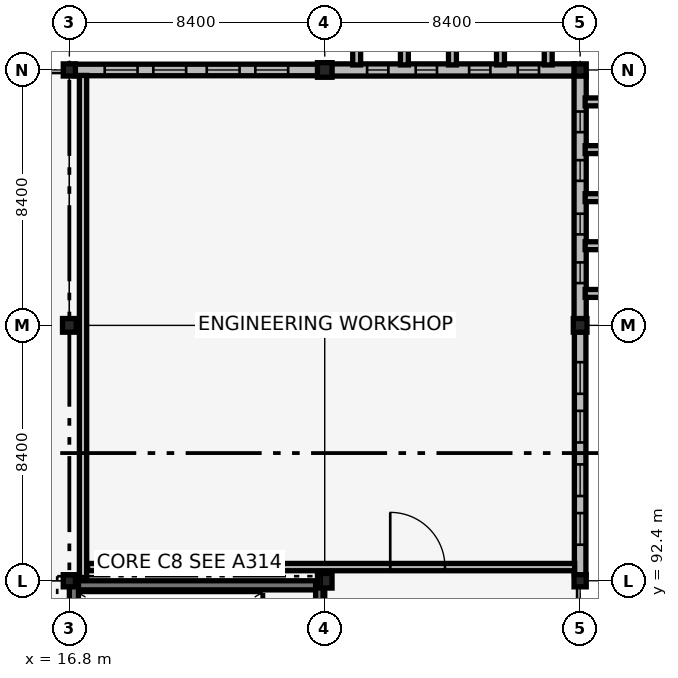
"""IFC4 building model, lengths in metres.
Left out: names, types, materials, properties, quantities, classifications, styles, units other than length and angle.
Written with IfcOpenShell. Run it as: python <this file> out.ifc"""

import sys

from ifc_helpers import new_model, si_unit, direction, frame, frame_2d, origin, origin_2d, place, context, subcontext, project, spatial, rectangle, extrude, element, fill, save


model = new_model("IFC4")
c1 = context("Model", 3, precision=1e-05, world=origin(), true_north=direction((0.0, 1.0)))
c2 = subcontext(c1, "Body", "Model", "MODEL_VIEW")
j1 = project(units=[si_unit("LENGTHUNIT", "METRE"), si_unit("PLANEANGLEUNIT", "RADIAN")], contexts=[c1])
p1 = place(None, origin())
s1 = spatial("IfcSite", under=j1, at=p1, CompositionType="ELEMENT")
p2 = place(p1, origin())
s2 = spatial("IfcBuilding", under=s1, at=p2, CompositionType="ELEMENT")
p3 = place(p2, frame((0.0, 0.0, 5.44)))
s3 = spatial("IfcBuildingStorey", under=s2, at=p3, CompositionType="ELEMENT", Elevation=5.44)
p4 = place(p3, frame((16.95, 92.25, 0.0), z_axis=(0.0, 0.0, 1.0), x_axis=(1.0, 0.0, 0.0)))
e1 = element("IfcWall", 1, at=p4, inside=s3, PredefinedType="SHEAR", context=c2, shape_type="SweptSolid", body=[
    extrude(rectangle(XDim=8.1, YDim=0.3, at=frame_2d((4.05, 0.0))), origin(), (0.0, 0.0, 1.0), 4.12),
])
p5 = place(p3, frame((16.95, 84.15, 0.0), z_axis=(0.0, 0.0, 1.0), x_axis=(0.0, 1.0, 0.0)))
e2 = element("IfcWall", 2, at=p5, inside=s3, PredefinedType="SHEAR", context=c2, shape_type="SweptSolid", body=[
    extrude(rectangle(XDim=8.1, YDim=0.3, at=frame_2d((4.05, 0.0))), origin(), (0.0, 0.0, 1.0), 4.12),
])
p6 = place(p5, frame((1.05, 0.0, 0.0)))
e3 = element("IfcOpeningElement", 3, at=p6, cuts=e2, PredefinedType="OPENING", context=c2, shape_type="SweptSolid", body=[
    extrude(rectangle(XDim=1.0, YDim=2.15, at=frame_2d((0.5, 1.075))), frame((0.0, 0.16, 0.0), z_axis=(0.0, -1.0, 0.0), x_axis=(1.0, 0.0, 0.0)), (0.0, 0.0, 1.0), 0.32),
])
p7 = place(p3, frame((25.05, 84.15, 0.0), z_axis=(0.0, 0.0, 1.0), x_axis=(0.0, 1.0, 0.0)))
e4 = element("IfcWall", 4, at=p7, inside=s3, PredefinedType="SHEAR", context=c2, shape_type="SweptSolid", body=[
    extrude(rectangle(XDim=8.1, YDim=0.3, at=frame_2d((4.05, 0.0))), origin(), (0.0, 0.0, 1.0), 4.12),
])
p8 = place(p7, frame((1.325, 0.0, 0.0)))
e5 = element("IfcOpeningElement", 5, at=p8, cuts=e4, PredefinedType="OPENING", context=c2, shape_type="SweptSolid", body=[
    extrude(rectangle(XDim=1.45, YDim=2.15, at=frame_2d((0.725, 1.075))), frame((0.0, 0.16, 0.0), z_axis=(0.0, -1.0, 0.0), x_axis=(1.0, 0.0, 0.0)), (0.0, 0.0, 1.0), 0.32),
])
p9 = place(p3, frame((16.8, 92.4, 0.0), z_axis=(0.0, 0.0, 1.0), x_axis=(1.0, 0.0, 0.0)))
e6 = element("IfcColumn", 6, at=p9, inside=s3, PredefinedType="COLUMN", context=c2, shape_type="SweptSolid", body=[
    extrude(rectangle(XDim=0.4, YDim=0.4, at=origin_2d()), origin(), (0.0, 0.0, 1.0), 4.12),
])
p10 = place(p3, frame((16.8, 100.8, 0.0), z_axis=(0.0, 0.0, 1.0), x_axis=(1.0, 0.0, 0.0)))
e7 = element("IfcColumn", 7, at=p10, inside=s3, PredefinedType="COLUMN", context=c2, shape_type="SweptSolid", body=[
    extrude(rectangle(XDim=0.45, YDim=0.45, at=origin_2d()), origin(), (0.0, 0.0, 1.0), 4.12),
])
p11 = place(p3, frame((16.8, 109.2, 0.0), z_axis=(0.0, 0.0, 1.0), x_axis=(1.0, 0.0, 0.0)))
e8 = element("IfcColumn", 8, at=p11, inside=s3, PredefinedType="COLUMN", context=c2, shape_type="SweptSolid", body=[
    extrude(rectangle(XDim=0.4, YDim=0.4, at=origin_2d()), origin(), (0.0, 0.0, 1.0), 4.12),
])
for number, where, z_axis, x_axis in (
    (9, (25.2, 92.4, 0.0), (0.0, 0.0, 1.0), (1.0, 0.0, 0.0)),
    (10, (25.2, 100.8, 0.0), (0.0, 0.0, 1.0), (1.0, 0.0, 0.0)),
    (11, (25.2, 109.2, 0.0), (0.0, 0.0, 1.0), (1.0, 0.0, 0.0)),
):
    element("IfcColumn", number, at=place(p3, frame(where, z_axis=z_axis, x_axis=x_axis)), inside=s3, PredefinedType="COLUMN", context=c2, shape_type="SweptSolid", body=[
        extrude(rectangle(XDim=0.48, YDim=0.48, at=origin_2d()), origin(), (0.0, 0.0, 1.0), 4.12),
    ])
p12 = place(p3, frame((33.6, 92.4, 0.0), z_axis=(0.0, 0.0, 1.0), x_axis=(1.0, 0.0, 0.0)))
e12 = element("IfcColumn", 12, at=p12, inside=s3, PredefinedType="COLUMN", context=c2, shape_type="SweptSolid", body=[
    extrude(rectangle(XDim=0.4, YDim=0.4, at=origin_2d()), origin(), (0.0, 0.0, 1.0), 4.12),
])
p13 = place(p3, frame((33.6, 100.8, 0.0), z_axis=(0.0, 0.0, 1.0), x_axis=(1.0, 0.0, 0.0)))
e13 = element("IfcColumn", 13, at=p13, inside=s3, PredefinedType="COLUMN", context=c2, shape_type="SweptSolid", body=[
    extrude(rectangle(XDim=0.45, YDim=0.45, at=origin_2d()), origin(), (0.0, 0.0, 1.0), 4.12),
])
p14 = place(p3, frame((33.6, 109.2, 0.0), z_axis=(0.0, 0.0, 1.0), x_axis=(1.0, 0.0, 0.0)))
e14 = element("IfcColumn", 14, at=p14, inside=s3, PredefinedType="COLUMN", context=c2, shape_type="SweptSolid", body=[
    extrude(rectangle(XDim=0.4, YDim=0.4, at=origin_2d()), origin(), (0.0, 0.0, 1.0), 4.12),
])
p15 = place(p3, frame((16.985, 109.2, 0.0), z_axis=(0.0, 0.0, 1.0), x_axis=(1.0, 0.0, 0.0)))
e15 = element("IfcWall", 15, at=p15, inside=s3, PredefinedType="SOLIDWALL", context=c2, shape_type="SweptSolid", body=[
    extrude(rectangle(XDim=7.99, YDim=0.38, at=frame_2d((3.995, 0.0))), origin(), (0.0, 0.0, 1.0), 4.12),
])
p16 = place(p15, frame((0.978, 0.0, 0.75)))
e16 = element("IfcOpeningElement", 16, at=p16, cuts=e15, PredefinedType="OPENING", context=c2, shape_type="SweptSolid", body=[
    extrude(rectangle(XDim=1.08, YDim=2.65, at=frame_2d((0.54, 1.325))), frame((0.0, 0.2, 0.0), z_axis=(0.0, -1.0, 0.0), x_axis=(1.0, 0.0, 0.0)), (0.0, 0.0, 1.0), 0.4),
])
p17 = place(p15, frame((2.576, 0.0, 0.75)))
e17 = element("IfcOpeningElement", 17, at=p17, cuts=e15, PredefinedType="OPENING", context=c2, shape_type="SweptSolid", body=[
    extrude(rectangle(XDim=1.08, YDim=2.65, at=frame_2d((0.54, 1.325))), frame((0.0, 0.2, 0.0), z_axis=(0.0, -1.0, 0.0), x_axis=(1.0, 0.0, 0.0)), (0.0, 0.0, 1.0), 0.4),
])
p18 = place(p15, frame((4.334, 0.0, 0.75)))
e18 = element("IfcOpeningElement", 18, at=p18, cuts=e15, PredefinedType="OPENING", context=c2, shape_type="SweptSolid", body=[
    extrude(rectangle(XDim=1.08, YDim=2.65, at=frame_2d((0.54, 1.325))), frame((0.0, 0.2, 0.0), z_axis=(0.0, -1.0, 0.0), x_axis=(1.0, 0.0, 0.0)), (0.0, 0.0, 1.0), 0.4),
])
p19 = place(p15, frame((5.932, 0.0, 0.75)))
e19 = element("IfcOpeningElement", 19, at=p19, cuts=e15, PredefinedType="OPENING", context=c2, shape_type="SweptSolid", body=[
    extrude(rectangle(XDim=1.08, YDim=2.65, at=frame_2d((0.54, 1.325))), frame((0.0, 0.2, 0.0), z_axis=(0.0, -1.0, 0.0), x_axis=(1.0, 0.0, 0.0)), (0.0, 0.0, 1.0), 0.4),
])
p20 = place(p3, frame((33.6, 92.585, 0.0), z_axis=(0.0, 0.0, 1.0), x_axis=(0.0, 1.0, 0.0)))
e20 = element("IfcWall", 20, at=p20, inside=s3, PredefinedType="SOLIDWALL", context=c2, shape_type="SweptSolid", body=[
    extrude(rectangle(XDim=8.005, YDim=0.38, at=frame_2d((4.002, 0.0))), origin(), (0.0, 0.0, 1.0), 4.12),
])
p21 = place(p20, frame((1.001, 0.0, 0.75)))
e21 = element("IfcOpeningElement", 21, at=p21, cuts=e20, PredefinedType="OPENING", context=c2, shape_type="SweptSolid", body=[
    extrude(rectangle(XDim=1.04, YDim=2.6, at=frame_2d((0.52, 1.3))), frame((0.0, 0.2, 0.0), z_axis=(0.0, -1.0, 0.0), x_axis=(1.0, 0.0, 0.0)), (0.0, 0.0, 1.0), 0.4),
])
p22 = place(p20, frame((2.602, 0.0, 0.75)))
e22 = element("IfcOpeningElement", 22, at=p22, cuts=e20, PredefinedType="OPENING", context=c2, shape_type="SweptSolid", body=[
    extrude(rectangle(XDim=1.04, YDim=2.6, at=frame_2d((0.52, 1.3))), frame((0.0, 0.2, 0.0), z_axis=(0.0, -1.0, 0.0), x_axis=(1.0, 0.0, 0.0)), (0.0, 0.0, 1.0), 0.4),
])
p23 = place(p20, frame((4.363, 0.0, 0.75)))
e23 = element("IfcOpeningElement", 23, at=p23, cuts=e20, PredefinedType="OPENING", context=c2, shape_type="SweptSolid", body=[
    extrude(rectangle(XDim=1.04, YDim=2.6, at=frame_2d((0.52, 1.3))), frame((0.0, 0.2, 0.0), z_axis=(0.0, -1.0, 0.0), x_axis=(1.0, 0.0, 0.0)), (0.0, 0.0, 1.0), 0.4),
])
p24 = place(p20, frame((5.964, 0.0, 0.75)))
e24 = element("IfcOpeningElement", 24, at=p24, cuts=e20, PredefinedType="OPENING", context=c2, shape_type="SweptSolid", body=[
    extrude(rectangle(XDim=1.04, YDim=2.6, at=frame_2d((0.52, 1.3))), frame((0.0, 0.2, 0.0), z_axis=(0.0, -1.0, 0.0), x_axis=(1.0, 0.0, 0.0)), (0.0, 0.0, 1.0), 0.4),
])
p25 = place(p3, frame((25.425, 109.2, 0.0), z_axis=(0.0, 0.0, 1.0), x_axis=(1.0, 0.0, 0.0)))
e25 = element("IfcWall", 25, at=p25, inside=s3, PredefinedType="SOLIDWALL", context=c2, shape_type="SweptSolid", body=[
    extrude(rectangle(XDim=7.99, YDim=0.4, at=frame_2d((3.995, 0.0))), origin(), (0.0, 0.0, 1.0), 4.12),
])
p26 = place(p25, frame((1.168, 0.0, 0.75)))
e26 = element("IfcOpeningElement", 26, at=p26, cuts=e25, PredefinedType="OPENING", context=c2, shape_type="SweptSolid", body=[
    extrude(rectangle(XDim=0.7, YDim=2.65, at=frame_2d((0.35, 1.325))), frame((0.0, 0.21, 0.0), z_axis=(0.0, -1.0, 0.0), x_axis=(1.0, 0.0, 0.0)), (0.0, 0.0, 1.0), 0.42),
])
p27 = place(p25, frame((2.766, 0.0, 0.75)))
e27 = element("IfcOpeningElement", 27, at=p27, cuts=e25, PredefinedType="OPENING", context=c2, shape_type="SweptSolid", body=[
    extrude(rectangle(XDim=0.7, YDim=2.65, at=frame_2d((0.35, 1.325))), frame((0.0, 0.21, 0.0), z_axis=(0.0, -1.0, 0.0), x_axis=(1.0, 0.0, 0.0)), (0.0, 0.0, 1.0), 0.42),
])
p28 = place(p25, frame((4.524, 0.0, 0.75)))
e28 = element("IfcOpeningElement", 28, at=p28, cuts=e25, PredefinedType="OPENING", context=c2, shape_type="SweptSolid", body=[
    extrude(rectangle(XDim=0.7, YDim=2.65, at=frame_2d((0.35, 1.325))), frame((0.0, 0.21, 0.0), z_axis=(0.0, -1.0, 0.0), x_axis=(1.0, 0.0, 0.0)), (0.0, 0.0, 1.0), 0.42),
])
p29 = place(p25, frame((6.122, 0.0, 0.75)))
e29 = element("IfcOpeningElement", 29, at=p29, cuts=e25, PredefinedType="OPENING", context=c2, shape_type="SweptSolid", body=[
    extrude(rectangle(XDim=0.7, YDim=2.65, at=frame_2d((0.35, 1.325))), frame((0.0, 0.21, 0.0), z_axis=(0.0, -1.0, 0.0), x_axis=(1.0, 0.0, 0.0)), (0.0, 0.0, 1.0), 0.42),
])
for number, where, z_axis, x_axis in (
    (30, (26.25, 109.365, 0.0), (0.0, 0.0, 1.0), (0.0, 1.0, 0.0)),
    (31, (27.82, 109.365, 0.0), (0.0, 0.0, 1.0), (0.0, 1.0, 0.0)),
    (32, (29.4, 109.365, 0.0), (0.0, 0.0, 1.0), (0.0, 1.0, 0.0)),
    (33, (30.98, 109.365, 0.0), (0.0, 0.0, 1.0), (0.0, 1.0, 0.0)),
    (34, (32.55, 109.365, 0.0), (0.0, 0.0, 1.0), (0.0, 1.0, 0.0)),
):
    element("IfcWall", number, at=place(p3, frame(where, z_axis=z_axis, x_axis=x_axis)), inside=s3, PredefinedType="SOLIDWALL", context=c2, shape_type="SweptSolid", body=[
        extrude(rectangle(XDim=0.7, YDim=0.26, at=frame_2d((0.35, 0.0))), origin(), (0.0, 0.0, 1.0), 4.42),
    ])
p30 = place(p3, frame((33.6, 101.01, 0.0), z_axis=(0.0, 0.0, 1.0), x_axis=(0.0, 1.0, 0.0)))
e35 = element("IfcWall", 35, at=p30, inside=s3, PredefinedType="SOLIDWALL", context=c2, shape_type="SweptSolid", body=[
    extrude(rectangle(XDim=8.005, YDim=0.4, at=frame_2d((4.002, 0.0))), origin(), (0.0, 0.0, 1.0), 4.12),
])
p31 = place(p30, frame((1.181, 0.0, 0.75)))
e36 = element("IfcOpeningElement", 36, at=p31, cuts=e35, PredefinedType="OPENING", context=c2, shape_type="SweptSolid", body=[
    extrude(rectangle(XDim=0.68, YDim=2.5, at=frame_2d((0.34, 1.25))), frame((0.0, 0.21, 0.0), z_axis=(0.0, -1.0, 0.0), x_axis=(1.0, 0.0, 0.0)), (0.0, 0.0, 1.0), 0.42),
])
p32 = place(p30, frame((2.782, 0.0, 0.75)))
e37 = element("IfcOpeningElement", 37, at=p32, cuts=e35, PredefinedType="OPENING", context=c2, shape_type="SweptSolid", body=[
    extrude(rectangle(XDim=0.68, YDim=2.5, at=frame_2d((0.34, 1.25))), frame((0.0, 0.21, 0.0), z_axis=(0.0, -1.0, 0.0), x_axis=(1.0, 0.0, 0.0)), (0.0, 0.0, 1.0), 0.42),
])
p33 = place(p30, frame((4.543, 0.0, 0.75)))
e38 = element("IfcOpeningElement", 38, at=p33, cuts=e35, PredefinedType="OPENING", context=c2, shape_type="SweptSolid", body=[
    extrude(rectangle(XDim=0.68, YDim=2.5, at=frame_2d((0.34, 1.25))), frame((0.0, 0.21, 0.0), z_axis=(0.0, -1.0, 0.0), x_axis=(1.0, 0.0, 0.0)), (0.0, 0.0, 1.0), 0.42),
])
p34 = place(p30, frame((6.144, 0.0, 0.75)))
e39 = element("IfcOpeningElement", 39, at=p34, cuts=e35, PredefinedType="OPENING", context=c2, shape_type="SweptSolid", body=[
    extrude(rectangle(XDim=0.68, YDim=2.5, at=frame_2d((0.34, 1.25))), frame((0.0, 0.21, 0.0), z_axis=(0.0, -1.0, 0.0), x_axis=(1.0, 0.0, 0.0)), (0.0, 0.0, 1.0), 0.42),
])
for number, where, z_axis, x_axis in (
    (40, (33.765, 101.85, 0.0), (0.0, 0.0, 1.0), (1.0, 0.0, 0.0)),
    (41, (33.765, 103.42, 0.0), (0.0, 0.0, 1.0), (1.0, 0.0, 0.0)),
    (42, (33.765, 105.0, 0.0), (0.0, 0.0, 1.0), (1.0, 0.0, 0.0)),
    (43, (33.765, 106.58, 0.0), (0.0, 0.0, 1.0), (1.0, 0.0, 0.0)),
    (44, (33.765, 108.15, 0.0), (0.0, 0.0, 1.0), (1.0, 0.0, 0.0)),
):
    element("IfcWall", number, at=place(p3, frame(where, z_axis=z_axis, x_axis=x_axis)), inside=s3, PredefinedType="SOLIDWALL", context=c2, shape_type="SweptSolid", body=[
        extrude(rectangle(XDim=0.7, YDim=0.26, at=frame_2d((0.35, 0.0))), origin(), (0.0, 0.0, 1.0), 4.42),
    ])
p35 = place(p3, frame((17.4, 92.85, 0.0), z_axis=(0.0, 0.0, 1.0), x_axis=(1.0, 0.0, 0.0)))
e45 = element("IfcWall", 45, at=p35, inside=s3, PredefinedType="PARTITIONING", context=c2, shape_type="SweptSolid", body=[
    extrude(rectangle(XDim=16.02, YDim=0.24, at=frame_2d((8.01, 0.0))), origin(), (0.0, 0.0, 1.0), 4.12),
])
p36 = place(p35, frame((9.954, 0.0, 0.0)))
e46 = element("IfcOpeningElement", 46, at=p36, cuts=e45, PredefinedType="OPENING", context=c2, shape_type="SweptSolid", body=[
    extrude(rectangle(XDim=1.8, YDim=2.4, at=frame_2d((0.9, 1.2))), frame((0.0, 0.13, 0.0), z_axis=(0.0, -1.0, 0.0), x_axis=(1.0, 0.0, 0.0)), (0.0, 0.0, 1.0), 0.26),
])
p37 = place(p3, frame((17.25, 92.43, 0.0), z_axis=(0.0, 0.0, 1.0), x_axis=(0.0, 1.0, 0.0)))
e47 = element("IfcWall", 47, at=p37, inside=s3, PredefinedType="PARTITIONING", context=c2, shape_type="SweptSolid", body=[
    extrude(rectangle(XDim=16.59, YDim=0.24, at=frame_2d((8.295, 0.0))), origin(), (0.0, 0.0, 1.0), 4.12),
])
p38 = place(p16, origin())
e48 = element("IfcWindow", 48, at=p38, inside=s3, PartitioningType="DOUBLE_PANEL_VERTICAL", PredefinedType="WINDOW", context=c2, shape_type="SweptSolid", body=[
    extrude(rectangle(XDim=1.08, YDim=2.65, at=frame_2d((0.54, 1.325))), frame((0.0, 0.03, 0.0), z_axis=(0.0, -1.0, 0.0), x_axis=(1.0, 0.0, 0.0)), (0.0, 0.0, 1.0), 0.06),
])
fill(e16, e48)
p39 = place(p17, origin())
e49 = element("IfcWindow", 49, at=p39, inside=s3, PartitioningType="DOUBLE_PANEL_VERTICAL", PredefinedType="WINDOW", context=c2, shape_type="SweptSolid", body=[
    extrude(rectangle(XDim=1.08, YDim=2.65, at=frame_2d((0.54, 1.325))), frame((0.0, 0.03, 0.0), z_axis=(0.0, -1.0, 0.0), x_axis=(1.0, 0.0, 0.0)), (0.0, 0.0, 1.0), 0.06),
])
fill(e17, e49)
p40 = place(p18, origin())
e50 = element("IfcWindow", 50, at=p40, inside=s3, PartitioningType="DOUBLE_PANEL_VERTICAL", PredefinedType="WINDOW", context=c2, shape_type="SweptSolid", body=[
    extrude(rectangle(XDim=1.08, YDim=2.65, at=frame_2d((0.54, 1.325))), frame((0.0, 0.03, 0.0), z_axis=(0.0, -1.0, 0.0), x_axis=(1.0, 0.0, 0.0)), (0.0, 0.0, 1.0), 0.06),
])
fill(e18, e50)
p41 = place(p19, origin())
e51 = element("IfcWindow", 51, at=p41, inside=s3, PartitioningType="DOUBLE_PANEL_VERTICAL", PredefinedType="WINDOW", context=c2, shape_type="SweptSolid", body=[
    extrude(rectangle(XDim=1.08, YDim=2.65, at=frame_2d((0.54, 1.325))), frame((0.0, 0.03, 0.0), z_axis=(0.0, -1.0, 0.0), x_axis=(1.0, 0.0, 0.0)), (0.0, 0.0, 1.0), 0.06),
])
fill(e19, e51)
p42 = place(p21, origin())
e52 = element("IfcWindow", 52, at=p42, inside=s3, PartitioningType="DOUBLE_PANEL_VERTICAL", PredefinedType="WINDOW", context=c2, shape_type="SweptSolid", body=[
    extrude(rectangle(XDim=1.04, YDim=2.6, at=frame_2d((0.52, 1.3))), frame((0.0, 0.03, 0.0), z_axis=(0.0, -1.0, 0.0), x_axis=(1.0, 0.0, 0.0)), (0.0, 0.0, 1.0), 0.06),
])
fill(e21, e52)
p43 = place(p22, origin())
e53 = element("IfcWindow", 53, at=p43, inside=s3, PartitioningType="DOUBLE_PANEL_VERTICAL", PredefinedType="WINDOW", context=c2, shape_type="SweptSolid", body=[
    extrude(rectangle(XDim=1.04, YDim=2.6, at=frame_2d((0.52, 1.3))), frame((0.0, 0.03, 0.0), z_axis=(0.0, -1.0, 0.0), x_axis=(1.0, 0.0, 0.0)), (0.0, 0.0, 1.0), 0.06),
])
fill(e22, e53)
p44 = place(p23, origin())
e54 = element("IfcWindow", 54, at=p44, inside=s3, PartitioningType="DOUBLE_PANEL_VERTICAL", PredefinedType="WINDOW", context=c2, shape_type="SweptSolid", body=[
    extrude(rectangle(XDim=1.04, YDim=2.6, at=frame_2d((0.52, 1.3))), frame((0.0, 0.03, 0.0), z_axis=(0.0, -1.0, 0.0), x_axis=(1.0, 0.0, 0.0)), (0.0, 0.0, 1.0), 0.06),
])
fill(e23, e54)
p45 = place(p24, origin())
e55 = element("IfcWindow", 55, at=p45, inside=s3, PartitioningType="DOUBLE_PANEL_VERTICAL", PredefinedType="WINDOW", context=c2, shape_type="SweptSolid", body=[
    extrude(rectangle(XDim=1.04, YDim=2.6, at=frame_2d((0.52, 1.3))), frame((0.0, 0.03, 0.0), z_axis=(0.0, -1.0, 0.0), x_axis=(1.0, 0.0, 0.0)), (0.0, 0.0, 1.0), 0.06),
])
fill(e24, e55)
p46 = place(p26, origin())
e56 = element("IfcWindow", 56, at=p46, inside=s3, PartitioningType="DOUBLE_PANEL_VERTICAL", PredefinedType="WINDOW", context=c2, shape_type="SweptSolid", body=[
    extrude(rectangle(XDim=0.7, YDim=2.65, at=frame_2d((0.35, 1.325))), frame((0.0, 0.03, 0.0), z_axis=(0.0, -1.0, 0.0), x_axis=(1.0, 0.0, 0.0)), (0.0, 0.0, 1.0), 0.06),
])
fill(e26, e56)
p47 = place(p27, origin())
e57 = element("IfcWindow", 57, at=p47, inside=s3, PartitioningType="DOUBLE_PANEL_VERTICAL", PredefinedType="WINDOW", context=c2, shape_type="SweptSolid", body=[
    extrude(rectangle(XDim=0.7, YDim=2.65, at=frame_2d((0.35, 1.325))), frame((0.0, 0.03, 0.0), z_axis=(0.0, -1.0, 0.0), x_axis=(1.0, 0.0, 0.0)), (0.0, 0.0, 1.0), 0.06),
])
fill(e27, e57)
p48 = place(p28, origin())
e58 = element("IfcWindow", 58, at=p48, inside=s3, PartitioningType="DOUBLE_PANEL_VERTICAL", PredefinedType="WINDOW", context=c2, shape_type="SweptSolid", body=[
    extrude(rectangle(XDim=0.7, YDim=2.65, at=frame_2d((0.35, 1.325))), frame((0.0, 0.03, 0.0), z_axis=(0.0, -1.0, 0.0), x_axis=(1.0, 0.0, 0.0)), (0.0, 0.0, 1.0), 0.06),
])
fill(e28, e58)
p49 = place(p29, origin())
e59 = element("IfcWindow", 59, at=p49, inside=s3, PartitioningType="DOUBLE_PANEL_VERTICAL", PredefinedType="WINDOW", context=c2, shape_type="SweptSolid", body=[
    extrude(rectangle(XDim=0.7, YDim=2.65, at=frame_2d((0.35, 1.325))), frame((0.0, 0.03, 0.0), z_axis=(0.0, -1.0, 0.0), x_axis=(1.0, 0.0, 0.0)), (0.0, 0.0, 1.0), 0.06),
])
fill(e29, e59)
p50 = place(p31, origin())
e60 = element("IfcWindow", 60, at=p50, inside=s3, PartitioningType="DOUBLE_PANEL_VERTICAL", PredefinedType="WINDOW", context=c2, shape_type="SweptSolid", body=[
    extrude(rectangle(XDim=0.68, YDim=2.5, at=frame_2d((0.34, 1.25))), frame((0.0, 0.03, 0.0), z_axis=(0.0, -1.0, 0.0), x_axis=(1.0, 0.0, 0.0)), (0.0, 0.0, 1.0), 0.06),
])
fill(e36, e60)
p51 = place(p32, origin())
e61 = element("IfcWindow", 61, at=p51, inside=s3, PartitioningType="DOUBLE_PANEL_VERTICAL", PredefinedType="WINDOW", context=c2, shape_type="SweptSolid", body=[
    extrude(rectangle(XDim=0.68, YDim=2.5, at=frame_2d((0.34, 1.25))), frame((0.0, 0.03, 0.0), z_axis=(0.0, -1.0, 0.0), x_axis=(1.0, 0.0, 0.0)), (0.0, 0.0, 1.0), 0.06),
])
fill(e37, e61)
p52 = place(p33, origin())
e62 = element("IfcWindow", 62, at=p52, inside=s3, PartitioningType="DOUBLE_PANEL_VERTICAL", PredefinedType="WINDOW", context=c2, shape_type="SweptSolid", body=[
    extrude(rectangle(XDim=0.68, YDim=2.5, at=frame_2d((0.34, 1.25))), frame((0.0, 0.03, 0.0), z_axis=(0.0, -1.0, 0.0), x_axis=(1.0, 0.0, 0.0)), (0.0, 0.0, 1.0), 0.06),
])
fill(e38, e62)
p53 = place(p34, origin())
e63 = element("IfcWindow", 63, at=p53, inside=s3, PartitioningType="DOUBLE_PANEL_VERTICAL", PredefinedType="WINDOW", context=c2, shape_type="SweptSolid", body=[
    extrude(rectangle(XDim=0.68, YDim=2.5, at=frame_2d((0.34, 1.25))), frame((0.0, 0.03, 0.0), z_axis=(0.0, -1.0, 0.0), x_axis=(1.0, 0.0, 0.0)), (0.0, 0.0, 1.0), 0.06),
])
fill(e39, e63)
p54 = place(p36, origin())
e64 = element("IfcDoor", 64, at=p54, inside=s3, OperationType="DOUBLE_DOOR_SINGLE_SWING", PredefinedType="DOOR", context=c2, shape_type="SweptSolid", body=[
    extrude(rectangle(XDim=1.8, YDim=2.4, at=frame_2d((0.9, 1.2))), frame((0.0, 0.025, 0.0), z_axis=(0.0, -1.0, 0.0), x_axis=(1.0, 0.0, 0.0)), (0.0, 0.0, 1.0), 0.05),
])
fill(e46, e64)
save(model, sys.argv[1])
